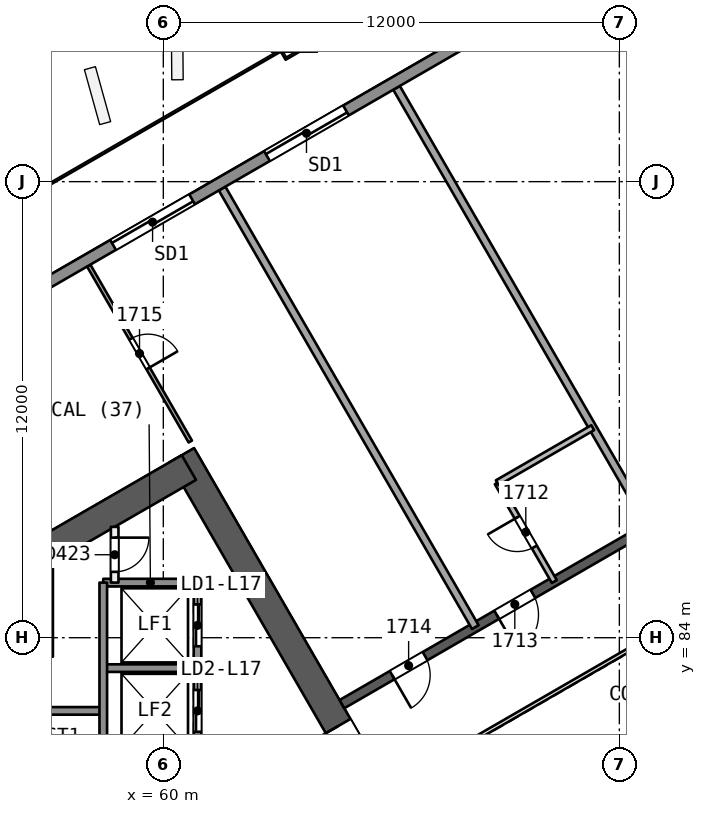
"""IFC4 building model, lengths in metres.
Left out: names, types, materials, properties, quantities, classifications, styles, units other than length and angle.
Written with IfcOpenShell. Run it as: python <this file> out.ifc"""

import sys

from ifc_helpers import new_model, si_unit, direction, frame, frame_2d, origin, origin_2d, place, context, subcontext, project, spatial, rectangle, extrude, element, fill, save


model = new_model("IFC4")
c1 = context("Model", 3, precision=1e-05, world=origin(), true_north=direction((0.0, 1.0)))
c2 = subcontext(c1, "Body", "Model", "MODEL_VIEW")
j1 = project(units=[si_unit("LENGTHUNIT", "METRE"), si_unit("PLANEANGLEUNIT", "RADIAN")], contexts=[c1])
p1 = place(None, origin())
s1 = spatial("IfcSite", under=j1, at=p1, CompositionType="ELEMENT")
p2 = place(p1, origin())
s2 = spatial("IfcBuilding", under=s1, at=p2, CompositionType="ELEMENT")
p3 = place(p2, frame((0.0, 0.0, 75.8)))
s3 = spatial("IfcBuildingStorey", under=s2, at=p3, CompositionType="ELEMENT", Elevation=75.8)
p4 = place(p3, frame((65.567, 80.0, 0.0), z_axis=(0.0, 0.0, 1.0), x_axis=(-0.499988615364, 0.866031976607, 0.0)))
e1 = element("IfcWall", 1, at=p4, inside=s3, PredefinedType="SHEAR", context=c2, shape_type="SweptSolid", body=[
    extrude(rectangle(XDim=10.163, YDim=0.75, at=frame_2d((5.082, 0.0))), origin(), (0.0, 0.0, 1.0), 3.7),
])
p5 = place(p4, frame((0.733, 0.0, 0.0)))
e2 = element("IfcOpeningElement", 2, at=p5, cuts=e1, PredefinedType="OPENING", context=c2, shape_type="SweptSolid", body=[
    extrude(rectangle(XDim=1.2, YDim=2.1, at=frame_2d((0.6, 1.05))), frame((0.0, 0.385, 0.0), z_axis=(0.0, -1.0, 0.0), x_axis=(1.0, 0.0, 0.0)), (0.0, 0.0, 1.0), 0.771),
])
p6 = place(p3, frame((60.673, 88.477, 0.0), z_axis=(0.0, 0.0, 1.0), x_axis=(-0.8660248072, -0.500001033313, 0.0)))
e3 = element("IfcWall", 3, at=p6, inside=s3, PredefinedType="SHEAR", context=c2, shape_type="SweptSolid", body=[
    extrude(rectangle(XDim=13.958, YDim=0.75, at=frame_2d((6.979, 0.0))), origin(), (0.0, 0.0, 1.0), 3.7),
])
p7 = place(p3, frame((78.2, 90.046, 0.0), z_axis=(0.0, 0.0, 1.0), x_axis=(-0.866026492143, -0.499998114903, 0.0)))
e4 = element("IfcWall", 4, at=p7, inside=s3, PredefinedType="SHEAR", context=c2, shape_type="SweptSolid", body=[
    extrude(rectangle(XDim=15.588, YDim=0.25, at=frame_2d((7.794, 0.0))), origin(), (0.0, 0.0, 1.0), 3.2),
])
p8 = place(p7, frame((4.718, 0.0, 0.0)))
e5 = element("IfcOpeningElement", 5, at=p8, cuts=e4, PredefinedType="OPENING", context=c2, shape_type="SweptSolid", body=[
    extrude(rectangle(XDim=1.0, YDim=2.1, at=frame_2d((0.5, 1.05))), frame((0.0, 0.135, 0.0), z_axis=(0.0, -1.0, 0.0), x_axis=(1.0, 0.0, 0.0)), (0.0, 0.0, 1.0), 0.271),
])
p9 = place(p7, frame((9.785, 0.0, 0.0)))
e6 = element("IfcOpeningElement", 6, at=p9, cuts=e4, PredefinedType="OPENING", context=c2, shape_type="SweptSolid", body=[
    extrude(rectangle(XDim=1.1, YDim=2.1, at=frame_2d((0.55, 1.05))), frame((0.0, 0.135, 0.0), z_axis=(0.0, -1.0, 0.0), x_axis=(1.0, 0.0, 0.0)), (0.0, 0.0, 1.0), 0.271),
])
p10 = place(p7, frame((13.062, 0.0, 0.0)))
e7 = element("IfcOpeningElement", 7, at=p10, cuts=e4, PredefinedType="OPENING", context=c2, shape_type="SweptSolid", body=[
    extrude(rectangle(XDim=1.0, YDim=2.1, at=frame_2d((0.5, 1.05))), frame((0.0, 0.135, 0.0), z_axis=(0.0, -1.0, 0.0), x_axis=(1.0, 0.0, 0.0)), (0.0, 0.0, 1.0), 0.271),
])
p11 = place(p3, frame((63.437, 100.027, 0.0), z_axis=(0.010093620709, -0.017482414954, 0.999796221231), x_axis=(-0.499897086036, 0.865849517735, 0.020187025824)))
e8 = element("IfcColumn", 8, at=p11, inside=s3, PredefinedType="COLUMN", context=c2, shape_type="SweptSolid", body=[
    extrude(rectangle(XDim=1.1, YDim=1.1, at=origin_2d()), origin(), (0.0, 0.0, 1.0), 3.701),
])
p12 = place(p3, frame((66.137, 98.469, 0.0), z_axis=(0.0, 0.0, 1.0), x_axis=(0.500006843521, -0.86602145264, 0.0)))
e9 = element("IfcWall", 9, at=p12, inside=s3, PredefinedType="PARTITIONING", context=c2, shape_type="SweptSolid", body=[
    extrude(rectangle(XDim=13.326, YDim=0.2, at=frame_2d((6.663, 0.0))), origin(), (0.0, 0.0, 1.0), 3.2),
])
p13 = place(p3, frame((70.289, 85.478, 0.0), z_axis=(0.0, 0.0, 1.0), x_axis=(-0.50002537861, 0.866010750942, 0.0)))
e10 = element("IfcWall", 10, at=p13, inside=s3, PredefinedType="PARTITIONING", context=c2, shape_type="SweptSolid", body=[
    extrude(rectangle(XDim=3.0, YDim=0.15, at=frame_2d((1.5, 0.0))), origin(), (0.0, 0.0, 1.0), 3.2),
])
p14 = place(p13, frame((1.05, 0.0, 0.0)))
e11 = element("IfcOpeningElement", 11, at=p14, cuts=e10, PredefinedType="OPENING", context=c2, shape_type="SweptSolid", body=[
    extrude(rectangle(XDim=0.9, YDim=2.1, at=frame_2d((0.45, 1.05))), frame((0.0, 0.085, 0.0), z_axis=(0.0, -1.0, 0.0), x_axis=(1.0, 0.0, 0.0)), (0.0, 0.0, 1.0), 0.171),
])
p15 = place(p3, frame((68.789, 88.076, 0.0), z_axis=(0.0, 0.0, 1.0), x_axis=(0.865996321171, 0.50005036918, 0.0)))
e12 = element("IfcWall", 12, at=p15, inside=s3, PredefinedType="PARTITIONING", context=c2, shape_type="SweptSolid", body=[
    extrude(rectangle(XDim=2.9, YDim=0.15, at=frame_2d((1.45, 0.0))), origin(), (0.0, 0.0, 1.0), 3.2),
])
p16 = place(p3, frame((61.547, 95.819, 0.0), z_axis=(0.0, 0.0, 1.0), x_axis=(0.499993103482, -0.866029385454, 0.0)))
e13 = element("IfcWall", 13, at=p16, inside=s3, PredefinedType="PARTITIONING", context=c2, shape_type="SweptSolid", body=[
    extrude(rectangle(XDim=13.326, YDim=0.2, at=frame_2d((6.663, 0.0))), origin(), (0.0, 0.0, 1.0), 3.2),
])
p17 = place(p3, frame((58.037, 93.793, 0.0), z_axis=(0.0, 0.0, 1.0), x_axis=(0.499974070055, -0.866040373927, 0.0)))
e14 = element("IfcWall", 14, at=p17, inside=s3, PredefinedType="PARTITIONING", context=c2, shape_type="SweptSolid", body=[
    extrude(rectangle(XDim=5.347, YDim=0.1, at=frame_2d((2.674, 0.0))), origin(), (0.0, 0.0, 1.0), 3.2),
])
p18 = place(p17, frame((2.224, 0.0, 0.0)))
e15 = element("IfcOpeningElement", 15, at=p18, cuts=e14, PredefinedType="OPENING", context=c2, shape_type="SweptSolid", body=[
    extrude(rectangle(XDim=0.9, YDim=2.1, at=frame_2d((0.45, 1.05))), frame((0.0, 0.061, 0.0), z_axis=(0.0, -1.0, 0.0), x_axis=(1.0, 0.0, 0.0)), (0.0, 0.0, 1.0), 0.121),
])
p19 = place(p3, frame((39.093, 83.027, 0.0), z_axis=(0.0, 0.0, 1.0), x_axis=(0.866024586246, 0.500001416016, 0.0)))
e16 = element("IfcWall", 16, at=p19, inside=s3, PredefinedType="SOLIDWALL", context=c2, shape_type="SweptSolid", body=[
    extrude(rectangle(XDim=59.166, YDim=0.3, at=frame_2d((29.583, 0.0))), origin(), (0.0, 0.0, 1.0), 3.2),
])
p20 = place(p19, frame((27.292, 0.0, 0.0)))
e17 = element("IfcOpeningElement", 17, at=p20, cuts=e16, PredefinedType="OPENING", context=c2, shape_type="SweptSolid", body=[
    extrude(rectangle(XDim=2.4, YDim=2.4, at=frame_2d((1.2, 1.2))), frame((0.0, 0.161, 0.0), z_axis=(0.0, -1.0, 0.0), x_axis=(1.0, 0.0, 0.0)), (0.0, 0.0, 1.0), 0.321),
])
p21 = place(p19, frame((22.615, 0.0, 0.0)))
e18 = element("IfcOpeningElement", 18, at=p21, cuts=e16, PredefinedType="OPENING", context=c2, shape_type="SweptSolid", body=[
    extrude(rectangle(XDim=2.4, YDim=2.4, at=frame_2d((1.2, 1.2))), frame((0.0, 0.161, 0.0), z_axis=(0.0, -1.0, 0.0), x_axis=(1.0, 0.0, 0.0)), (0.0, 0.0, 1.0), 0.321),
])
p22 = place(p19, frame((10.88, 0.0, 0.0)))
e19 = element("IfcOpeningElement", 19, at=p22, cuts=e16, PredefinedType="OPENING", context=c2, shape_type="SweptSolid", body=[
    extrude(rectangle(XDim=2.4, YDim=2.4, at=frame_2d((1.2, 1.2))), frame((0.0, 0.161, 0.0), z_axis=(0.0, -1.0, 0.0), x_axis=(1.0, 0.0, 0.0)), (0.0, 0.0, 1.0), 0.321),
])
p23 = place(p19, frame((43.998, 0.0, 0.0)))
e20 = element("IfcOpeningElement", 20, at=p23, cuts=e16, PredefinedType="OPENING", context=c2, shape_type="SweptSolid", body=[
    extrude(rectangle(XDim=2.4, YDim=2.4, at=frame_2d((1.2, 1.2))), frame((0.0, 0.161, 0.0), z_axis=(0.0, -1.0, 0.0), x_axis=(1.0, 0.0, 0.0)), (0.0, 0.0, 1.0), 0.321),
])
for number, where, z_axis, x_axis in (
    (21, (60.9, 85.45, 0.0), (0.0, 0.0, 1.0), (-1.0, 0.0, 0.0)),
    (22, (60.9, 83.2, 0.0), (0.0, 0.0, 1.0), (-1.0, 0.0, 0.0)),
):
    element("IfcWall", number, at=place(p3, frame(where, z_axis=z_axis, x_axis=x_axis)), inside=s3, PredefinedType="SOLIDWALL", context=c2, shape_type="SweptSolid", body=[
        extrude(rectangle(XDim=2.48, YDim=0.2, at=frame_2d((1.24, 0.0))), origin(), (0.0, 0.0, 1.0), 3.2),
    ])
p24 = place(p3, frame((58.42, 82.075, 0.0), z_axis=(0.0, 0.0, 1.0), x_axis=(-1.0, 0.0, 0.0)))
e23 = element("IfcWall", 23, at=p24, inside=s3, PredefinedType="SOLIDWALL", context=c2, shape_type="SweptSolid", body=[
    extrude(rectangle(XDim=7.7, YDim=0.2, at=frame_2d((3.85, 0.0))), origin(), (0.0, 0.0, 1.0), 3.2),
])
p25 = place(p3, frame((60.9, 85.45, 0.0), z_axis=(0.0, 0.0, 1.0), x_axis=(0.0, -1.0, 0.0)))
e24 = element("IfcWall", 24, at=p25, inside=s3, PredefinedType="SOLIDWALL", context=c2, shape_type="SweptSolid", body=[
    extrude(rectangle(XDim=10.9, YDim=0.2, at=frame_2d((5.45, 0.0))), origin(), (0.0, 0.0, 1.0), 3.2),
])
p26 = place(p25, frame((0.575, 0.0, 0.0)))
e25 = element("IfcOpeningElement", 25, at=p26, cuts=e24, PredefinedType="OPENING", context=c2, shape_type="SweptSolid", body=[
    extrude(rectangle(XDim=1.1, YDim=2.1, at=frame_2d((0.55, 1.05))), frame((0.0, 0.11, 0.0), z_axis=(0.0, -1.0, 0.0), x_axis=(1.0, 0.0, 0.0)), (0.0, 0.0, 1.0), 0.221),
])
p27 = place(p25, frame((2.825, 0.0, 0.0)))
e26 = element("IfcOpeningElement", 26, at=p27, cuts=e24, PredefinedType="OPENING", context=c2, shape_type="SweptSolid", body=[
    extrude(rectangle(XDim=1.1, YDim=2.1, at=frame_2d((0.55, 1.05))), frame((0.0, 0.11, 0.0), z_axis=(0.0, -1.0, 0.0), x_axis=(1.0, 0.0, 0.0)), (0.0, 0.0, 1.0), 0.221),
])
p28 = place(p25, frame((5.075, 0.0, 0.0)))
e27 = element("IfcOpeningElement", 27, at=p28, cuts=e24, PredefinedType="OPENING", context=c2, shape_type="SweptSolid", body=[
    extrude(rectangle(XDim=1.1, YDim=2.1, at=frame_2d((0.55, 1.05))), frame((0.0, 0.11, 0.0), z_axis=(0.0, -1.0, 0.0), x_axis=(1.0, 0.0, 0.0)), (0.0, 0.0, 1.0), 0.221),
])
p29 = place(p25, frame((7.325, 0.0, 0.0)))
e28 = element("IfcOpeningElement", 28, at=p29, cuts=e24, PredefinedType="OPENING", context=c2, shape_type="SweptSolid", body=[
    extrude(rectangle(XDim=1.1, YDim=2.1, at=frame_2d((0.55, 1.05))), frame((0.0, 0.11, 0.0), z_axis=(0.0, -1.0, 0.0), x_axis=(1.0, 0.0, 0.0)), (0.0, 0.0, 1.0), 0.221),
])
p30 = place(p3, frame((58.72, 86.917, 0.0), z_axis=(0.0, 0.0, 1.0), x_axis=(0.0, -1.0, 0.0)))
e29 = element("IfcWall", 29, at=p30, inside=s3, PredefinedType="PARTITIONING", context=c2, shape_type="SweptSolid", body=[
    extrude(rectangle(XDim=1.467, YDim=0.2, at=frame_2d((0.733, 0.0))), origin(), (0.0, 0.0, 1.0), 3.2),
])
p31 = place(p30, frame((0.283, 0.0, 0.0)))
e30 = element("IfcOpeningElement", 30, at=p31, cuts=e29, PredefinedType="OPENING", context=c2, shape_type="SweptSolid", body=[
    extrude(rectangle(XDim=0.9, YDim=2.1, at=frame_2d((0.45, 1.05))), frame((0.0, 0.11, 0.0), z_axis=(0.0, -1.0, 0.0), x_axis=(1.0, 0.0, 0.0)), (0.0, 0.0, 1.0), 0.221),
])
p32 = place(p3, frame((58.42, 85.45, 0.0), z_axis=(0.0, 0.0, 1.0), x_axis=(0.0, -1.0, 0.0)))
e31 = element("IfcWall", 31, at=p32, inside=s3, PredefinedType="SOLIDWALL", context=c2, shape_type="SweptSolid", body=[
    extrude(rectangle(XDim=9.0, YDim=0.2, at=frame_2d((4.5, 0.0))), origin(), (0.0, 0.0, 1.0), 3.2),
])
p33 = place(p3, frame((57.02, 85.935, 0.0), z_axis=(0.0, 0.0, 1.0), x_axis=(0.0, -1.0, 0.0)))
e32 = element("IfcWall", 32, at=p33, inside=s3, PredefinedType="PARTITIONING", context=c2, shape_type="SweptSolid", body=[
    extrude(rectangle(XDim=2.435, YDim=0.15, at=frame_2d((1.218, 0.0))), origin(), (0.0, 0.0, 1.0), 3.2),
])
p34 = place(p3, frame((77.738, 86.846, 0.0), z_axis=(0.0, 0.0, 1.0), x_axis=(-0.866026658274, -0.499997827154, 0.0)))
e33 = element("IfcWall", 33, at=p34, inside=s3, PredefinedType="PARTITIONING", context=c2, shape_type="SweptSolid", body=[
    extrude(rectangle(XDim=11.588, YDim=0.1, at=frame_2d((5.794, 0.0))), origin(), (0.0, 0.0, 1.0), 3.2),
])
p35 = place(p14, origin())
e34 = element("IfcDoor", 34, at=p35, inside=s3, OperationType="SINGLE_SWING_RIGHT", PredefinedType="NOTDEFINED", context=c2, shape_type="SweptSolid", body=[
    extrude(rectangle(XDim=0.9, YDim=2.1, at=frame_2d((0.45, 1.05))), frame((0.0, 0.025, 0.0), z_axis=(0.0, -1.0, 0.0), x_axis=(1.0, 0.0, 0.0)), (0.0, 0.0, 1.0), 0.05),
])
fill(e11, e34)
p36 = place(p9, origin())
e35 = element("IfcDoor", 35, at=p36, inside=s3, OperationType="SINGLE_SWING_RIGHT", PredefinedType="NOTDEFINED", context=c2, shape_type="SweptSolid", body=[
    extrude(rectangle(XDim=1.1, YDim=2.1, at=frame_2d((0.55, 1.05))), frame((0.0, 0.025, 0.0), z_axis=(0.0, -1.0, 0.0), x_axis=(1.0, 0.0, 0.0)), (0.0, 0.0, 1.0), 0.05),
])
fill(e6, e35)
p37 = place(p10, origin())
e36 = element("IfcDoor", 36, at=p37, inside=s3, OperationType="SINGLE_SWING_RIGHT", PredefinedType="NOTDEFINED", context=c2, shape_type="SweptSolid", body=[
    extrude(rectangle(XDim=1.0, YDim=2.1, at=frame_2d((0.5, 1.05))), frame((0.0, 0.025, 0.0), z_axis=(0.0, -1.0, 0.0), x_axis=(1.0, 0.0, 0.0)), (0.0, 0.0, 1.0), 0.05),
])
fill(e7, e36)
p38 = place(p18, origin())
e37 = element("IfcDoor", 37, at=p38, inside=s3, OperationType="SINGLE_SWING_RIGHT", PredefinedType="NOTDEFINED", context=c2, shape_type="SweptSolid", body=[
    extrude(rectangle(XDim=0.9, YDim=2.1, at=frame_2d((0.45, 1.05))), frame((0.0, 0.025, 0.0), z_axis=(0.0, -1.0, 0.0), x_axis=(1.0, 0.0, 0.0)), (0.0, 0.0, 1.0), 0.05),
])
fill(e15, e37)
p39 = place(p20, origin())
e38 = element("IfcDoor", 38, at=p39, inside=s3, OperationType="SLIDING_TO_LEFT", PredefinedType="NOTDEFINED", context=c2, shape_type="SweptSolid", body=[
    extrude(rectangle(XDim=2.4, YDim=2.4, at=frame_2d((1.2, 1.2))), frame((0.0, 0.025, 0.0), z_axis=(0.0, -1.0, 0.0), x_axis=(1.0, 0.0, 0.0)), (0.0, 0.0, 1.0), 0.05),
])
fill(e17, e38)
p40 = place(p21, origin())
e39 = element("IfcDoor", 39, at=p40, inside=s3, OperationType="SLIDING_TO_RIGHT", PredefinedType="NOTDEFINED", context=c2, shape_type="SweptSolid", body=[
    extrude(rectangle(XDim=2.4, YDim=2.4, at=frame_2d((1.2, 1.2))), frame((0.0, 0.025, 0.0), z_axis=(0.0, -1.0, 0.0), x_axis=(1.0, 0.0, 0.0)), (0.0, 0.0, 1.0), 0.05),
])
fill(e18, e39)
p41 = place(p5, origin())
e40 = element("IfcDoor", 40, at=p41, inside=s3, OperationType="SINGLE_SWING_RIGHT", PredefinedType="NOTDEFINED", context=c2, shape_type="SweptSolid", body=[
    extrude(rectangle(XDim=1.2, YDim=2.1, at=frame_2d((0.6, 1.05))), frame((0.0, 0.025, 0.0), z_axis=(0.0, -1.0, 0.0), x_axis=(1.0, 0.0, 0.0)), (0.0, 0.0, 1.0), 0.05),
])
fill(e2, e40)
p42 = place(p26, origin())
e41 = element("IfcDoor", 41, at=p42, inside=s3, OperationType="SLIDING_TO_RIGHT", PredefinedType="NOTDEFINED", context=c2, shape_type="SweptSolid", body=[
    extrude(rectangle(XDim=1.1, YDim=2.1, at=frame_2d((0.55, 1.05))), frame((0.0, 0.025, 0.0), z_axis=(0.0, -1.0, 0.0), x_axis=(1.0, 0.0, 0.0)), (0.0, 0.0, 1.0), 0.05),
])
fill(e25, e41)
p43 = place(p27, origin())
e42 = element("IfcDoor", 42, at=p43, inside=s3, OperationType="SLIDING_TO_LEFT", PredefinedType="NOTDEFINED", context=c2, shape_type="SweptSolid", body=[
    extrude(rectangle(XDim=1.1, YDim=2.1, at=frame_2d((0.55, 1.05))), frame((0.0, 0.025, 0.0), z_axis=(0.0, -1.0, 0.0), x_axis=(1.0, 0.0, 0.0)), (0.0, 0.0, 1.0), 0.05),
])
fill(e26, e42)
p44 = place(p31, origin())
e43 = element("IfcDoor", 43, at=p44, inside=s3, OperationType="SINGLE_SWING_LEFT", PredefinedType="NOTDEFINED", context=c2, shape_type="SweptSolid", body=[
    extrude(rectangle(XDim=0.9, YDim=2.1, at=frame_2d((0.45, 1.05))), frame((0.0, 0.025, 0.0), z_axis=(0.0, -1.0, 0.0), x_axis=(1.0, 0.0, 0.0)), (0.0, 0.0, 1.0), 0.05),
])
fill(e30, e43)
save(model, sys.argv[1])
